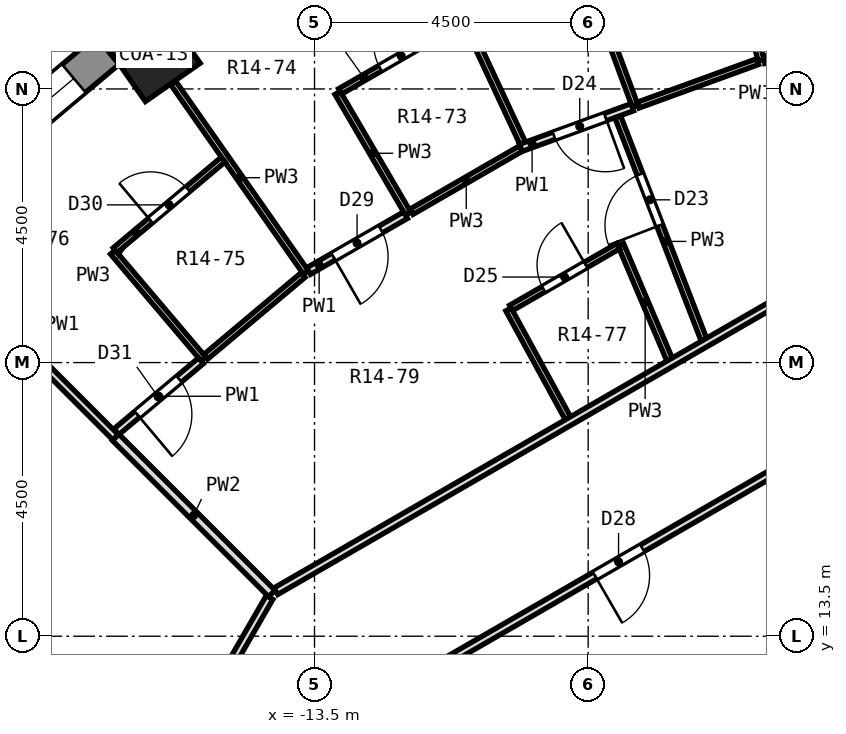
"""IFC4 building model, lengths in metres.
Left out: names, types, materials, properties, quantities, classifications, styles, units other than length and angle.
Written with IfcOpenShell. Run it as: python <this file> out.ifc"""

import sys

from ifc_helpers import new_model, si_unit, direction, frame, frame_2d, origin, origin_2d, place, context, subcontext, project, spatial, polyline, rectangle, outline, extrude, element, fill, save


model = new_model("IFC4")
c1 = context("Model", 3, precision=1e-05, world=origin(), true_north=direction((0.0, 1.0)))
c2 = subcontext(c1, "Body", "Model", "MODEL_VIEW")
j1 = project(units=[si_unit("LENGTHUNIT", "METRE"), si_unit("PLANEANGLEUNIT", "RADIAN")], contexts=[c1])
p1 = place(None, origin())
s1 = spatial("IfcSite", under=j1, at=p1, CompositionType="ELEMENT")
p2 = place(p1, origin())
s2 = spatial("IfcBuilding", under=s1, at=p2, CompositionType="ELEMENT")
p3 = place(p2, frame((0.0, 0.0, 75.8)))
s3 = spatial("IfcBuildingStorey", under=s2, at=p3, CompositionType="ELEMENT", Elevation=75.8)
p4 = place(p3, frame((-16.146, 23.059, 0.0), z_axis=(0.0, 0.0, 1.0), x_axis=(-0.573576436351, 0.819152044289, 0.0)))
e1 = element("IfcColumn", 1, at=p4, inside=s3, PredefinedType="COLUMN", context=c2, shape_type="SweptSolid", body=[
    extrude(rectangle(XDim=1.1, YDim=1.1, at=origin_2d()), origin(), (0.0, 0.0, 1.0), 3.3),
])
p5 = place(p3, frame((-16.904, 23.137, 0.0), z_axis=(0.0, 0.0, 1.0), x_axis=(-0.766026164483, -0.642809392687, 0.0)))
e2 = element("IfcWall", 2, at=p5, inside=s3, PredefinedType="SOLIDWALL", context=c2, shape_type="SweptSolid", body=[
    extrude(rectangle(XDim=3.846, YDim=0.6, at=frame_2d((1.923, 0.0))), origin(), (0.0, 0.0, 1.0), 2.75),
])
p6 = place(p5, frame((0.723, 0.0, 0.9)))
e3 = element("IfcOpeningElement", 3, at=p6, cuts=e2, PredefinedType="OPENING", context=c2, shape_type="SweptSolid", body=[
    extrude(rectangle(XDim=2.4, YDim=1.8, at=frame_2d((1.2, 0.9))), frame((0.0, 0.312, 0.0), z_axis=(0.0, -1.0, 0.0), x_axis=(1.0, 0.0, 0.0)), (0.0, 0.0, 1.0), 0.624),
])
p7 = place(p3, origin())
e4 = element("IfcWall", 4, at=p7, inside=s3, PredefinedType="SOLIDWALL", context=c2, shape_type="SweptSolid", body=[
    extrude(outline(polyline([(-16.11, 24.058), (-17.097, 23.367), (-16.711, 22.907), (-16.912, 23.194), (-16.011, 23.825), (-15.81, 23.538), (-16.11, 24.058)])), origin(), (0.0, 0.0, 1.0), 2.75),
])
p8 = place(p3, frame((-7.14, 26.65, 0.0), z_axis=(0.0, 0.0, 1.0), x_axis=(0.258575921205, -0.965990938349, 0.0)))
e5 = element("IfcWall", 5, at=p8, inside=s3, PredefinedType="PARTITIONING", context=c2, shape_type="SweptSolid", body=[
    extrude(rectangle(XDim=3.81, YDim=0.1, at=frame_2d((1.905, 0.0))), origin(), (0.0, 0.0, 1.0), 2.75),
])
p9 = place(p3, frame((-9.026, 24.372, 0.0), z_axis=(0.0, 0.0, 1.0), x_axis=(0.347431936108, -0.937705204087, 0.0)))
e6 = element("IfcWall", 6, at=p9, inside=s3, PredefinedType="PARTITIONING", context=c2, shape_type="SweptSolid", body=[
    extrude(rectangle(XDim=2.299, YDim=0.1, at=frame_2d((1.15, 0.0))), origin(), (0.0, 0.0, 1.0), 2.75),
])
p10 = place(p3, frame((-8.514, 22.045, 0.0), z_axis=(0.0, 0.0, 1.0), x_axis=(0.360450824224, -0.932778217647, 0.0)))
e7 = element("IfcWall", 7, at=p10, inside=s3, PredefinedType="PARTITIONING", context=c2, shape_type="SweptSolid", body=[
    extrude(rectangle(XDim=3.934, YDim=0.1, at=frame_2d((1.967, 0.0))), origin(), (0.0, 0.0, 1.0), 2.75),
])
p11 = place(p10, frame((1.017, 0.0, 0.0)))
e8 = element("IfcOpeningElement", 8, at=p11, cuts=e7, PredefinedType="OPENING", context=c2, shape_type="SweptSolid", body=[
    extrude(rectangle(XDim=0.9, YDim=2.1, at=frame_2d((0.45, 1.05))), frame((0.0, 0.062, 0.0), z_axis=(0.0, -1.0, 0.0), x_axis=(1.0, 0.0, 0.0)), (0.0, 0.0, 1.0), 0.124),
])
p12 = place(p3, frame((-8.464, 19.939, 0.0), z_axis=(0.0, 0.0, 1.0), x_axis=(0.391032350376, -0.920376934174, 0.0)))
e9 = element("IfcWall", 9, at=p12, inside=s3, PredefinedType="PARTITIONING", context=c2, shape_type="SweptSolid", body=[
    extrude(rectangle(XDim=2.053, YDim=0.1, at=frame_2d((1.026, 0.0))), origin(), (0.0, 0.0, 1.0), 2.75),
])
p13 = place(p3, frame((-11.66, 25.005, 0.0), z_axis=(0.0, 0.0, 1.0), x_axis=(0.422316636066, -0.906448376303, 0.0)))
e10 = element("IfcWall", 10, at=p13, inside=s3, PredefinedType="PARTITIONING", context=c2, shape_type="SweptSolid", body=[
    extrude(rectangle(XDim=3.76, YDim=0.1, at=frame_2d((1.88, 0.0))), origin(), (0.0, 0.0, 1.0), 2.75),
])
p14 = place(p3, frame((-10.31, 18.874, 0.0), z_axis=(0.0, 0.0, 1.0), x_axis=(0.479305195881, -0.877648294707, 0.0)))
e11 = element("IfcWall", 11, at=p14, inside=s3, PredefinedType="PARTITIONING", context=c2, shape_type="SweptSolid", body=[
    extrude(rectangle(XDim=2.039, YDim=0.1, at=frame_2d((1.019, 0.0))), origin(), (0.0, 0.0, 1.0), 2.75),
])
p15 = place(p3, frame((-13.121, 22.435, 0.0), z_axis=(0.0, 0.0, 1.0), x_axis=(0.504708754908, -0.863289680651, 0.0)))
e12 = element("IfcWall", 12, at=p15, inside=s3, PredefinedType="PARTITIONING", context=c2, shape_type="SweptSolid", body=[
    extrude(rectangle(XDim=2.301, YDim=0.1, at=frame_2d((1.15, 0.0))), origin(), (0.0, 0.0, 1.0), 2.75),
])
p16 = place(p3, frame((-15.825, 22.601, 0.0), z_axis=(0.0, 0.0, 1.0), x_axis=(0.573574167811, -0.819153632733, 0.0)))
e13 = element("IfcWall", 13, at=p16, inside=s3, PredefinedType="PARTITIONING", context=c2, shape_type="SweptSolid", body=[
    extrude(rectangle(XDim=3.81, YDim=0.1, at=frame_2d((1.905, 0.0))), origin(), (0.0, 0.0, 1.0), 2.75),
])
p17 = place(p3, frame((-16.817, 19.816, 0.0), z_axis=(0.0, 0.0, 1.0), x_axis=(0.646883930741, -0.762588473653, 0.0)))
e14 = element("IfcWall", 14, at=p17, inside=s3, PredefinedType="PARTITIONING", context=c2, shape_type="SweptSolid", body=[
    extrude(rectangle(XDim=2.3, YDim=0.1, at=frame_2d((1.15, 0.0))), origin(), (0.0, 0.0, 1.0), 2.75),
])
p18 = place(p3, frame((-19.509, 19.509, 0.0), z_axis=(0.0, 0.0, 1.0), x_axis=(0.707106781187, -0.707106781187, 0.0)))
e15 = element("IfcWall", 15, at=p18, inside=s3, PredefinedType="PARTITIONING", context=c2, shape_type="SweptSolid", body=[
    extrude(rectangle(XDim=3.873, YDim=0.125, at=frame_2d((1.936, 0.0))), origin(), (0.0, 0.0, 1.0), 2.75),
])
p19 = place(p3, frame((-16.771, 16.771, 0.0), z_axis=(0.0, 0.0, 1.0), x_axis=(0.707106781187, -0.707106781187, 0.0)))
e16 = element("IfcWall", 16, at=p19, inside=s3, PredefinedType="PARTITIONING", context=c2, shape_type="SweptSolid", body=[
    extrude(rectangle(XDim=3.633, YDim=0.15, at=frame_2d((1.816, 0.0))), origin(), (0.0, 0.0, 1.0), 2.75),
])
p20 = place(p3, frame((-6.106, 22.979, 0.0), z_axis=(0.0, 0.0, 1.0), x_axis=(0.984808921368, 0.173641551464, 0.0)))
e17 = element("IfcWall", 17, at=p20, inside=s3, PredefinedType="PARTITIONING", context=c2, shape_type="SweptSolid", body=[
    extrude(rectangle(XDim=1.841, YDim=0.125, at=frame_2d((0.92, 0.0))), origin(), (0.0, 0.0, 1.0), 2.75),
])
p21 = place(p20, frame((0.47, 0.0, 0.0)))
e18 = element("IfcOpeningElement", 18, at=p21, cuts=e17, PredefinedType="OPENING", context=c2, shape_type="SweptSolid", body=[
    extrude(rectangle(XDim=0.9, YDim=2.1, at=frame_2d((0.45, 1.05))), frame((0.0, 0.074, 0.0), z_axis=(0.0, -1.0, 0.0), x_axis=(1.0, 0.0, 0.0)), (0.0, 0.0, 1.0), 0.149),
])
p22 = place(p3, frame((-8.18, 22.233, 0.0), z_axis=(0.0, 0.0, 1.0), x_axis=(0.939708229367, 0.341977256056, 0.0)))
e19 = element("IfcWall", 19, at=p22, inside=s3, PredefinedType="PARTITIONING", context=c2, shape_type="SweptSolid", body=[
    extrude(rectangle(XDim=2.093, YDim=0.1, at=frame_2d((1.046, 0.0))), origin(), (0.0, 0.0, 1.0), 2.75),
])
p23 = place(p3, frame((-10.11, 21.53, 0.0), z_axis=(0.0, 0.0, 1.0), x_axis=(0.939599898996, 0.342274786986, 0.0)))
e20 = element("IfcWall", 20, at=p23, inside=s3, PredefinedType="PARTITIONING", context=c2, shape_type="SweptSolid", body=[
    extrude(rectangle(XDim=1.954, YDim=0.125, at=frame_2d((0.977, 0.0))), origin(), (0.0, 0.0, 1.0), 2.75),
])
p24 = place(p23, frame((0.583, 0.0, 0.0)))
e21 = element("IfcOpeningElement", 21, at=p24, cuts=e20, PredefinedType="OPENING", context=c2, shape_type="SweptSolid", body=[
    extrude(rectangle(XDim=0.9, YDim=2.1, at=frame_2d((0.45, 1.05))), frame((0.0, 0.074, 0.0), z_axis=(0.0, -1.0, 0.0), x_axis=(1.0, 0.0, 0.0)), (0.0, 0.0, 1.0), 0.149),
])
p25 = place(p3, frame((-13.597, 19.506, 0.0), z_axis=(0.0, 0.0, 1.0), x_axis=(0.866538954681, 0.499109446936, 0.0)))
e22 = element("IfcWall", 22, at=p25, inside=s3, PredefinedType="PARTITIONING", context=c2, shape_type="SweptSolid", body=[
    extrude(rectangle(XDim=1.839, YDim=0.125, at=frame_2d((0.919, 0.0))), origin(), (0.0, 0.0, 1.0), 2.75),
])
p26 = place(p25, frame((0.47, 0.0, 0.0)))
e23 = element("IfcOpeningElement", 23, at=p26, cuts=e22, PredefinedType="OPENING", context=c2, shape_type="SweptSolid", body=[
    extrude(rectangle(XDim=0.9, YDim=2.1, at=frame_2d((0.45, 1.05))), frame((0.0, 0.074, 0.0), z_axis=(0.0, -1.0, 0.0), x_axis=(1.0, 0.0, 0.0)), (0.0, 0.0, 1.0), 0.149),
])
p27 = place(p3, frame((-12.391, 12.476, 0.0), z_axis=(0.0, 0.0, 1.0), x_axis=(0.866042609802, 0.499970197119, 0.0)))
e24 = element("IfcWall", 24, at=p27, inside=s3, PredefinedType="PARTITIONING", context=c2, shape_type="SweptSolid", body=[
    extrude(rectangle(XDim=8.985, YDim=0.125, at=frame_2d((4.493, 0.0))), origin(), (0.0, 0.0, 1.0), 2.75),
])
p28 = place(p27, frame((4.043, 0.0, 0.0)))
e25 = element("IfcOpeningElement", 25, at=p28, cuts=e24, PredefinedType="OPENING", context=c2, shape_type="SweptSolid", body=[
    extrude(rectangle(XDim=0.9, YDim=2.1, at=frame_2d((0.45, 1.05))), frame((0.0, 0.074, 0.0), z_axis=(0.0, -1.0, 0.0), x_axis=(1.0, 0.0, 0.0)), (0.0, 0.0, 1.0), 0.149),
])
p29 = place(p3, frame((-14.137, 14.24, 0.0), z_axis=(0.0, 0.0, 1.0), x_axis=(0.866045301435, 0.499965534674, 0.0)))
e26 = element("IfcWall", 26, at=p29, inside=s3, PredefinedType="PARTITIONING", context=c2, shape_type="SweptSolid", body=[
    extrude(rectangle(XDim=10.259, YDim=0.125, at=frame_2d((5.129, 0.0))), origin(), (0.0, 0.0, 1.0), 2.75),
])
p30 = place(p3, frame((-10.267, 18.899, 0.0), z_axis=(0.0, 0.0, 1.0), x_axis=(0.866149564305, 0.499784885981, 0.0)))
e27 = element("IfcWall", 27, at=p30, inside=s3, PredefinedType="PARTITIONING", context=c2, shape_type="SweptSolid", body=[
    extrude(rectangle(XDim=2.031, YDim=0.1, at=frame_2d((1.016, 0.0))), origin(), (0.0, 0.0, 1.0), 2.75),
])
p31 = place(p30, frame((0.615, 0.0, 0.0)))
e28 = element("IfcOpeningElement", 28, at=p31, cuts=e27, PredefinedType="OPENING", context=c2, shape_type="SweptSolid", body=[
    extrude(rectangle(XDim=0.8, YDim=2.1, at=frame_2d((0.4, 1.05))), frame((0.0, 0.062, 0.0), z_axis=(0.0, -1.0, 0.0), x_axis=(1.0, 0.0, 0.0)), (0.0, 0.0, 1.0), 0.124),
])
p32 = place(p3, frame((-11.906, 20.48, 0.0), z_axis=(0.0, 0.0, 1.0), x_axis=(0.865966712092, 0.500101643217, 0.0)))
e29 = element("IfcWall", 29, at=p32, inside=s3, PredefinedType="PARTITIONING", context=c2, shape_type="SweptSolid", body=[
    extrude(rectangle(XDim=2.081, YDim=0.1, at=frame_2d((1.04, 0.0))), origin(), (0.0, 0.0, 1.0), 2.75),
])
p33 = place(p3, frame((-13.078, 22.46, 0.0), z_axis=(0.0, 0.0, 1.0), x_axis=(0.865947141423, 0.500135529893, 0.0)))
e30 = element("IfcWall", 30, at=p33, inside=s3, PredefinedType="PARTITIONING", context=c2, shape_type="SweptSolid", body=[
    extrude(rectangle(XDim=2.319, YDim=0.1, at=frame_2d((1.16, 0.0))), origin(), (0.0, 0.0, 1.0), 2.75),
])
p34 = place(p33, frame((0.76, 0.0, 0.0)))
e31 = element("IfcOpeningElement", 31, at=p34, cuts=e30, PredefinedType="OPENING", context=c2, shape_type="SweptSolid", body=[
    extrude(rectangle(XDim=0.8, YDim=2.1, at=frame_2d((0.4, 1.05))), frame((0.0, 0.062, 0.0), z_axis=(0.0, -1.0, 0.0), x_axis=(1.0, 0.0, 0.0)), (0.0, 0.0, 1.0), 0.124),
])
p35 = place(p3, frame((-15.291, 18.094, 0.0), z_axis=(0.0, 0.0, 1.0), x_axis=(0.765911671875, 0.642945807114, 0.0)))
e32 = element("IfcWall", 32, at=p35, inside=s3, PredefinedType="PARTITIONING", context=c2, shape_type="SweptSolid", body=[
    extrude(rectangle(XDim=2.093, YDim=0.1, at=frame_2d((1.046, 0.0))), origin(), (0.0, 0.0, 1.0), 2.75),
])
p36 = place(p3, frame((-16.758, 16.863, 0.0), z_axis=(0.0, 0.0, 1.0), x_axis=(0.766088979655, 0.642734529375, 0.0)))
e33 = element("IfcWall", 33, at=p36, inside=s3, PredefinedType="PARTITIONING", context=c2, shape_type="SweptSolid", body=[
    extrude(rectangle(XDim=1.815, YDim=0.125, at=frame_2d((0.907, 0.0))), origin(), (0.0, 0.0, 1.0), 2.75),
])
p37 = place(p36, frame((0.445, 0.0, 0.0)))
e34 = element("IfcOpeningElement", 34, at=p37, cuts=e33, PredefinedType="OPENING", context=c2, shape_type="SweptSolid", body=[
    extrude(rectangle(XDim=0.9, YDim=2.1, at=frame_2d((0.45, 1.05))), frame((0.0, 0.074, 0.0), z_axis=(0.0, -1.0, 0.0), x_axis=(1.0, 0.0, 0.0)), (0.0, 0.0, 1.0), 0.149),
])
p38 = place(p3, frame((-16.779, 19.848, 0.0), z_axis=(0.0, 0.0, 1.0), x_axis=(0.766051078848, 0.642779701449, 0.0)))
e35 = element("IfcWall", 35, at=p38, inside=s3, PredefinedType="PARTITIONING", context=c2, shape_type="SweptSolid", body=[
    extrude(rectangle(XDim=2.319, YDim=0.1, at=frame_2d((1.16, 0.0))), origin(), (0.0, 0.0, 1.0), 2.75),
])
p39 = place(p38, frame((0.76, 0.0, 0.0)))
e36 = element("IfcOpeningElement", 36, at=p39, cuts=e35, PredefinedType="OPENING", context=c2, shape_type="SweptSolid", body=[
    extrude(rectangle(XDim=0.8, YDim=2.1, at=frame_2d((0.4, 1.05))), frame((0.0, 0.062, 0.0), z_axis=(0.0, -1.0, 0.0), x_axis=(1.0, 0.0, 0.0)), (0.0, 0.0, 1.0), 0.124),
])
p40 = place(p3, frame((-16.262, 10.634, 0.0), z_axis=(0.0, 0.0, 1.0), x_axis=(0.499962802816, 0.866046878523, 0.0)))
e37 = element("IfcWall", 37, at=p40, inside=s3, PredefinedType="PARTITIONING", context=c2, shape_type="SweptSolid", body=[
    extrude(rectangle(XDim=4.045, YDim=0.125, at=frame_2d((2.022, 0.0))), origin(), (0.0, 0.0, 1.0), 2.75),
])
p41 = place(p40, frame((1.529, 0.0, 0.0)))
e38 = element("IfcOpeningElement", 38, at=p41, cuts=e37, PredefinedType="OPENING", context=c2, shape_type="SweptSolid", body=[
    extrude(rectangle(XDim=1.0, YDim=2.1, at=frame_2d((0.5, 1.05))), frame((0.0, 0.074, 0.0), z_axis=(0.0, -1.0, 0.0), x_axis=(1.0, 0.0, 0.0)), (0.0, 0.0, 1.0), 0.149),
])
p42 = place(p6, origin())
e39 = element("IfcWindow", 39, at=p42, inside=s3, PartitioningType="SINGLE_PANEL", PredefinedType="WINDOW", context=c2, shape_type="SweptSolid", body=[
    extrude(rectangle(XDim=2.4, YDim=1.8, at=frame_2d((1.2, 0.9))), frame((0.0, 0.18, 0.0), z_axis=(0.0, -1.0, 0.0), x_axis=(1.0, 0.0, 0.0)), (0.0, 0.0, 1.0), 0.06),
])
fill(e3, e39)
p43 = place(p11, frame((0.9, 0.0, 0.0), z_axis=(0.0, 0.0, 1.0), x_axis=(-1.0, 0.0, 0.0)))
e40 = element("IfcDoor", 40, at=p43, inside=s3, OperationType="SINGLE_SWING_LEFT", PredefinedType="DOOR", context=c2, shape_type="SweptSolid", body=[
    extrude(rectangle(XDim=0.9, YDim=2.1, at=frame_2d((0.45, 1.05))), frame((0.0, 0.025, 0.0), z_axis=(0.0, -1.0, 0.0), x_axis=(1.0, 0.0, 0.0)), (0.0, 0.0, 1.0), 0.05),
])
fill(e8, e40)
p44 = place(p24, frame((0.9, 0.0, 0.0), z_axis=(0.0, 0.0, 1.0), x_axis=(-1.0, 0.0, 0.0)))
e41 = element("IfcDoor", 41, at=p44, inside=s3, OperationType="SINGLE_SWING_LEFT", PredefinedType="DOOR", context=c2, shape_type="SweptSolid", body=[
    extrude(rectangle(XDim=0.9, YDim=2.1, at=frame_2d((0.45, 1.05))), frame((0.0, 0.025, 0.0), z_axis=(0.0, -1.0, 0.0), x_axis=(1.0, 0.0, 0.0)), (0.0, 0.0, 1.0), 0.05),
])
fill(e21, e41)
p45 = place(p31, origin())
e42 = element("IfcDoor", 42, at=p45, inside=s3, OperationType="SINGLE_SWING_RIGHT", PredefinedType="DOOR", context=c2, shape_type="SweptSolid", body=[
    extrude(rectangle(XDim=0.8, YDim=2.1, at=frame_2d((0.4, 1.05))), frame((0.0, 0.025, 0.0), z_axis=(0.0, -1.0, 0.0), x_axis=(1.0, 0.0, 0.0)), (0.0, 0.0, 1.0), 0.05),
])
fill(e28, e42)
p46 = place(p34, origin())
e43 = element("IfcDoor", 43, at=p46, inside=s3, OperationType="SINGLE_SWING_RIGHT", PredefinedType="DOOR", context=c2, shape_type="SweptSolid", body=[
    extrude(rectangle(XDim=0.8, YDim=2.1, at=frame_2d((0.4, 1.05))), frame((0.0, 0.025, 0.0), z_axis=(0.0, -1.0, 0.0), x_axis=(1.0, 0.0, 0.0)), (0.0, 0.0, 1.0), 0.05),
])
fill(e31, e43)
p47 = place(p28, frame((0.9, 0.0, 0.0), z_axis=(0.0, 0.0, 1.0), x_axis=(-1.0, 0.0, 0.0)))
e44 = element("IfcDoor", 44, at=p47, inside=s3, OperationType="SINGLE_SWING_RIGHT", PredefinedType="DOOR", context=c2, shape_type="SweptSolid", body=[
    extrude(rectangle(XDim=0.9, YDim=2.1, at=frame_2d((0.45, 1.05))), frame((0.0, 0.025, 0.0), z_axis=(0.0, -1.0, 0.0), x_axis=(1.0, 0.0, 0.0)), (0.0, 0.0, 1.0), 0.05),
])
fill(e25, e44)
p48 = place(p26, frame((0.9, 0.0, 0.0), z_axis=(0.0, 0.0, 1.0), x_axis=(-1.0, 0.0, 0.0)))
e45 = element("IfcDoor", 45, at=p48, inside=s3, OperationType="SINGLE_SWING_RIGHT", PredefinedType="DOOR", context=c2, shape_type="SweptSolid", body=[
    extrude(rectangle(XDim=0.9, YDim=2.1, at=frame_2d((0.45, 1.05))), frame((0.0, 0.025, 0.0), z_axis=(0.0, -1.0, 0.0), x_axis=(1.0, 0.0, 0.0)), (0.0, 0.0, 1.0), 0.05),
])
fill(e23, e45)
p49 = place(p39, origin())
e46 = element("IfcDoor", 46, at=p49, inside=s3, OperationType="SINGLE_SWING_LEFT", PredefinedType="DOOR", context=c2, shape_type="SweptSolid", body=[
    extrude(rectangle(XDim=0.8, YDim=2.1, at=frame_2d((0.4, 1.05))), frame((0.0, 0.025, 0.0), z_axis=(0.0, -1.0, 0.0), x_axis=(1.0, 0.0, 0.0)), (0.0, 0.0, 1.0), 0.05),
])
fill(e36, e46)
p50 = place(p37, frame((0.9, 0.0, 0.0), z_axis=(0.0, 0.0, 1.0), x_axis=(-1.0, 0.0, 0.0)))
e47 = element("IfcDoor", 47, at=p50, inside=s3, OperationType="SINGLE_SWING_RIGHT", PredefinedType="DOOR", context=c2, shape_type="SweptSolid", body=[
    extrude(rectangle(XDim=0.9, YDim=2.1, at=frame_2d((0.45, 1.05))), frame((0.0, 0.025, 0.0), z_axis=(0.0, -1.0, 0.0), x_axis=(1.0, 0.0, 0.0)), (0.0, 0.0, 1.0), 0.05),
])
fill(e34, e47)
save(model, sys.argv[1])
